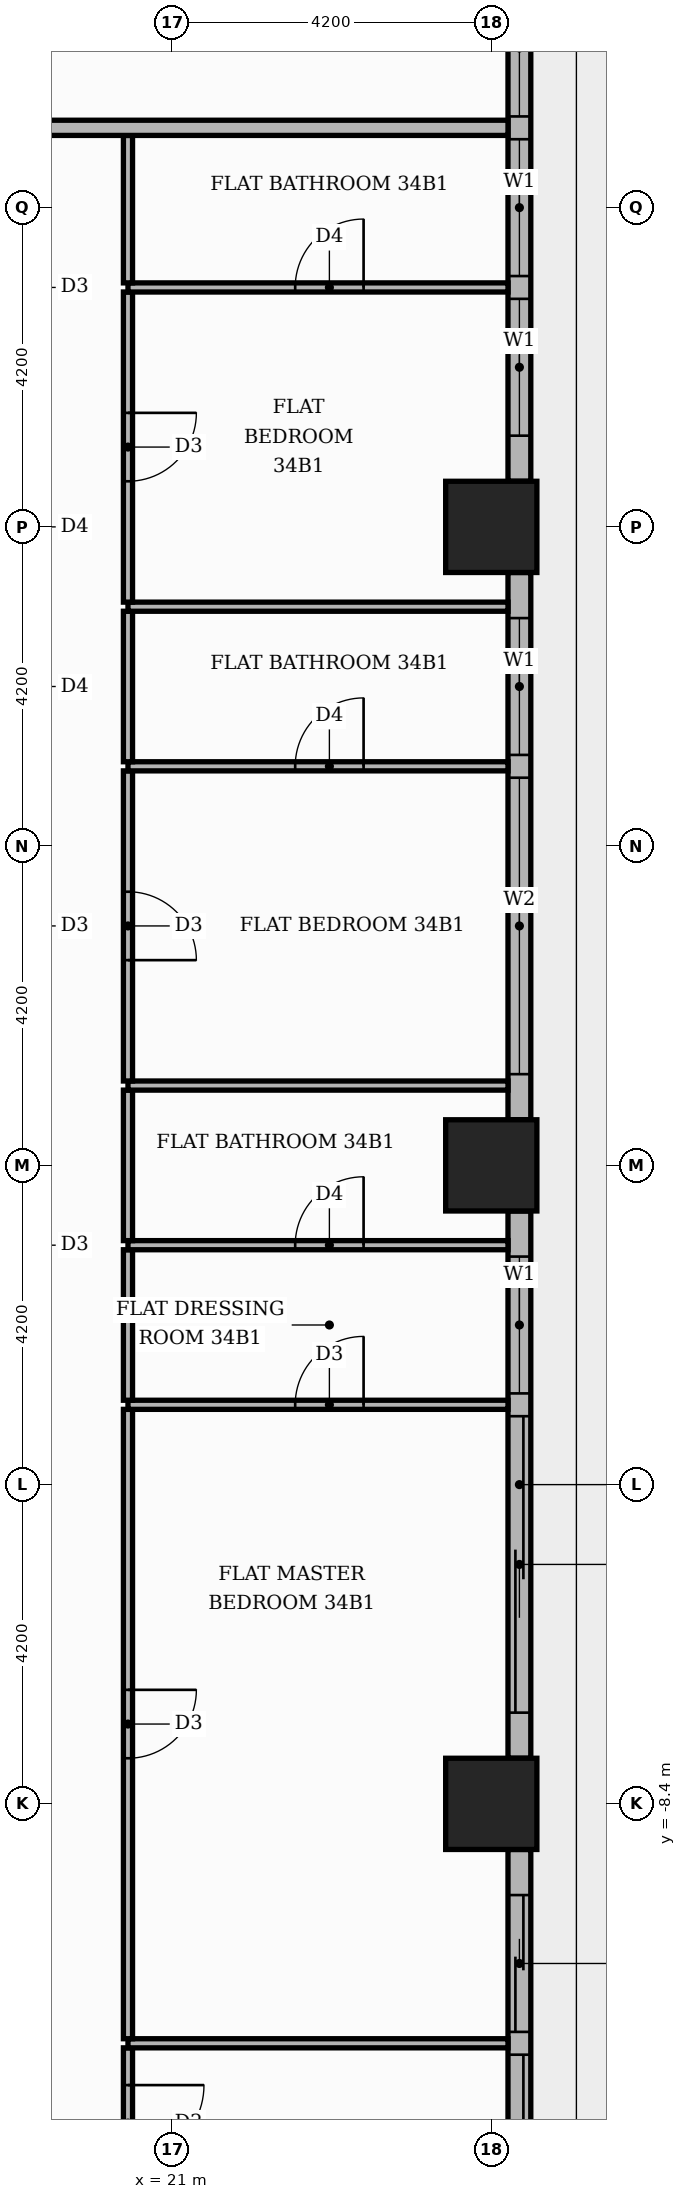
"""IFC4 building model, lengths in metres.
Left out: names, types, materials, properties, quantities, classifications, styles, units other than length and angle.
Written with IfcOpenShell. Run it as: python <this file> out.ifc"""

import sys

from ifc_helpers import new_model, si_unit, direction, frame, frame_2d, origin, origin_2d, place, context, subcontext, project, spatial, rectangle, extrude, element, fill, save


model = new_model("IFC4")
c1 = context("Model", 3, precision=1e-05, world=origin(), true_north=direction((0.0, 1.0)))
c2 = subcontext(c1, "Body", "Model", "MODEL_VIEW")
j1 = project(units=[si_unit("LENGTHUNIT", "METRE"), si_unit("PLANEANGLEUNIT", "RADIAN")], contexts=[c1])
p1 = place(None, origin())
s1 = spatial("IfcSite", under=j1, at=p1, CompositionType="ELEMENT")
p2 = place(p1, origin())
s2 = spatial("IfcBuilding", under=s1, at=p2, CompositionType="ELEMENT")
p3 = place(p2, frame((0.0, 0.0, 145.5)))
s3 = spatial("IfcBuildingStorey", under=s2, at=p3, CompositionType="ELEMENT", Elevation=145.5)
for number, where, z_axis, x_axis in (
    (1, (25.2, 0.0, 0.0), (0.0, 0.0, 1.0), (1.0, 0.0, 0.0)),
    (2, (25.2, 8.4, 0.0), (0.0, 0.0, 1.0), (1.0, 0.0, 0.0)),
    (3, (25.2, -8.4, 0.0), (0.0, 0.0, 1.0), (1.0, 0.0, 0.0)),
):
    element("IfcColumn", number, at=place(p3, frame(where, z_axis=z_axis, x_axis=x_axis)), inside=s3, PredefinedType="COLUMN", context=c2, shape_type="SweptSolid", body=[
        extrude(rectangle(XDim=1.2, YDim=1.2, at=origin_2d()), origin(), (0.0, 0.0, 1.0), 3.9),
    ])
p4 = place(p3, frame((25.57, -16.2, 0.0), z_axis=(0.0, 0.0, 1.0), x_axis=(0.0, 1.0, 0.0)))
e4 = element("IfcWall", 4, at=p4, inside=s3, PredefinedType="STANDARD", context=c2, shape_type="SweptSolid", body=[
    extrude(rectangle(XDim=7.2, YDim=0.3, at=frame_2d((3.6, 0.0))), origin(), (0.0, 0.0, 1.0), 3.48),
])
p5 = place(p4, frame((0.6, 0.0, 0.0)))
e5 = element("IfcOpeningElement", 5, at=p5, cuts=e4, PredefinedType="OPENING", context=c2, shape_type="SweptSolid", body=[
    extrude(rectangle(XDim=3.9, YDim=2.4, at=frame_2d((1.95, 1.2))), frame((0.0, 0.16, 0.0), z_axis=(0.0, -1.0, 0.0), x_axis=(1.0, 0.0, 0.0)), (0.0, 0.0, 1.0), 0.32),
])
p6 = place(p4, frame((4.8, 0.0, 0.0)))
e6 = element("IfcOpeningElement", 6, at=p6, cuts=e4, PredefinedType="OPENING", context=c2, shape_type="SweptSolid", body=[
    extrude(rectangle(XDim=1.8, YDim=2.4, at=frame_2d((0.9, 1.2))), frame((0.0, 0.16, 0.0), z_axis=(0.0, -1.0, 0.0), x_axis=(1.0, 0.0, 0.0)), (0.0, 0.0, 1.0), 0.32),
])
p7 = place(p3, frame((25.57, -7.8, 0.0), z_axis=(0.0, 0.0, 1.0), x_axis=(0.0, 1.0, 0.0)))
e7 = element("IfcWall", 7, at=p7, inside=s3, PredefinedType="STANDARD", context=c2, shape_type="SweptSolid", body=[
    extrude(rectangle(XDim=7.2, YDim=0.3, at=frame_2d((3.6, 0.0))), origin(), (0.0, 0.0, 1.0), 3.48),
])
p8 = place(p7, frame((0.6, 0.0, 0.0)))
e8 = element("IfcOpeningElement", 8, at=p8, cuts=e7, PredefinedType="OPENING", context=c2, shape_type="SweptSolid", body=[
    extrude(rectangle(XDim=3.9, YDim=2.4, at=frame_2d((1.95, 1.2))), frame((0.0, 0.16, 0.0), z_axis=(0.0, -1.0, 0.0), x_axis=(1.0, 0.0, 0.0)), (0.0, 0.0, 1.0), 0.32),
])
p9 = place(p7, frame((4.8, 0.0, 0.9)))
e9 = element("IfcOpeningElement", 9, at=p9, cuts=e7, PredefinedType="OPENING", context=c2, shape_type="SweptSolid", body=[
    extrude(rectangle(XDim=1.8, YDim=2.1, at=frame_2d((0.9, 1.05))), frame((0.0, 0.16, 0.0), z_axis=(0.0, -1.0, 0.0), x_axis=(1.0, 0.0, 0.0)), (0.0, 0.0, 1.0), 0.32),
])
p10 = place(p3, frame((25.57, 0.6, 0.0), z_axis=(0.0, 0.0, 1.0), x_axis=(0.0, 1.0, 0.0)))
e10 = element("IfcWall", 10, at=p10, inside=s3, PredefinedType="STANDARD", context=c2, shape_type="SweptSolid", body=[
    extrude(rectangle(XDim=7.2, YDim=0.3, at=frame_2d((3.6, 0.0))), origin(), (0.0, 0.0, 1.0), 3.48),
])
p11 = place(p10, frame((0.6, 0.0, 0.9)))
e11 = element("IfcOpeningElement", 11, at=p11, cuts=e10, PredefinedType="OPENING", context=c2, shape_type="SweptSolid", body=[
    extrude(rectangle(XDim=3.9, YDim=2.1, at=frame_2d((1.95, 1.05))), frame((0.0, 0.16, 0.0), z_axis=(0.0, -1.0, 0.0), x_axis=(1.0, 0.0, 0.0)), (0.0, 0.0, 1.0), 0.32),
])
p12 = place(p10, frame((4.8, 0.0, 0.9)))
e12 = element("IfcOpeningElement", 12, at=p12, cuts=e10, PredefinedType="OPENING", context=c2, shape_type="SweptSolid", body=[
    extrude(rectangle(XDim=1.8, YDim=2.1, at=frame_2d((0.9, 1.05))), frame((0.0, 0.16, 0.0), z_axis=(0.0, -1.0, 0.0), x_axis=(1.0, 0.0, 0.0)), (0.0, 0.0, 1.0), 0.32),
])
p13 = place(p3, frame((25.57, 9.0, 0.0), z_axis=(0.0, 0.0, 1.0), x_axis=(0.0, 1.0, 0.0)))
e13 = element("IfcWall", 13, at=p13, inside=s3, PredefinedType="STANDARD", context=c2, shape_type="SweptSolid", body=[
    extrude(rectangle(XDim=7.2, YDim=0.3, at=frame_2d((3.6, 0.0))), origin(), (0.0, 0.0, 1.0), 3.48),
])
p14 = place(p13, frame((0.6, 0.0, 0.9)))
e14 = element("IfcOpeningElement", 14, at=p14, cuts=e13, PredefinedType="OPENING", context=c2, shape_type="SweptSolid", body=[
    extrude(rectangle(XDim=1.8, YDim=2.1, at=frame_2d((0.9, 1.05))), frame((0.0, 0.16, 0.0), z_axis=(0.0, -1.0, 0.0), x_axis=(1.0, 0.0, 0.0)), (0.0, 0.0, 1.0), 0.32),
])
p15 = place(p13, frame((2.7, 0.0, 0.9)))
e15 = element("IfcOpeningElement", 15, at=p15, cuts=e13, PredefinedType="OPENING", context=c2, shape_type="SweptSolid", body=[
    extrude(rectangle(XDim=1.8, YDim=2.1, at=frame_2d((0.9, 1.05))), frame((0.0, 0.16, 0.0), z_axis=(0.0, -1.0, 0.0), x_axis=(1.0, 0.0, 0.0)), (0.0, 0.0, 1.0), 0.32),
])
p16 = place(p13, frame((4.8, 0.0, 0.9)))
e16 = element("IfcOpeningElement", 16, at=p16, cuts=e13, PredefinedType="OPENING", context=c2, shape_type="SweptSolid", body=[
    extrude(rectangle(XDim=1.8, YDim=2.1, at=frame_2d((0.9, 1.05))), frame((0.0, 0.16, 0.0), z_axis=(0.0, -1.0, 0.0), x_axis=(1.0, 0.0, 0.0)), (0.0, 0.0, 1.0), 0.32),
])
p17 = place(p3, frame((20.42, -13.59, 0.0), z_axis=(0.0, 0.0, 1.0), x_axis=(0.0, 1.0, 0.0)))
e17 = element("IfcWall", 17, at=p17, inside=s3, PredefinedType="PARTITIONING", context=c2, shape_type="SweptSolid", body=[
    extrude(rectangle(XDim=1.98, YDim=0.12, at=frame_2d((0.99, 0.0))), origin(), (0.0, 0.0, 1.0), 3.48),
])
p18 = place(p17, frame((0.49, 0.0, 0.0)))
e18 = element("IfcOpeningElement", 18, at=p18, cuts=e17, PredefinedType="OPENING", context=c2, shape_type="SweptSolid", body=[
    extrude(rectangle(XDim=1.0, YDim=2.1, at=frame_2d((0.5, 1.05))), frame((0.0, 0.07, 0.0), z_axis=(0.0, -1.0, 0.0), x_axis=(1.0, 0.0, 0.0)), (0.0, 0.0, 1.0), 0.14),
])
p19 = place(p3, frame((20.42, -11.55, 0.0), z_axis=(0.0, 0.0, 1.0), x_axis=(1.0, 0.0, 0.0)))
e19 = element("IfcWall", 19, at=p19, inside=s3, PredefinedType="PARTITIONING", context=c2, shape_type="SweptSolid", body=[
    extrude(rectangle(XDim=5.0, YDim=0.12, at=frame_2d((2.5, 0.0))), origin(), (0.0, 0.0, 1.0), 3.48),
])
p20 = place(p3, frame((20.42, -11.49, 0.0), z_axis=(0.0, 0.0, 1.0), x_axis=(0.0, 1.0, 0.0)))
e20 = element("IfcWall", 20, at=p20, inside=s3, PredefinedType="PARTITIONING", context=c2, shape_type="SweptSolid", body=[
    extrude(rectangle(XDim=8.28, YDim=0.12, at=frame_2d((4.14, 0.0))), origin(), (0.0, 0.0, 1.0), 3.48),
])
p21 = place(p20, frame((3.69, 0.0, 0.0)))
e21 = element("IfcOpeningElement", 21, at=p21, cuts=e20, PredefinedType="OPENING", context=c2, shape_type="SweptSolid", body=[
    extrude(rectangle(XDim=0.9, YDim=2.1, at=frame_2d((0.45, 1.05))), frame((0.0, 0.07, 0.0), z_axis=(0.0, -1.0, 0.0), x_axis=(1.0, 0.0, 0.0)), (0.0, 0.0, 1.0), 0.14),
])
p22 = place(p3, frame((20.42, -3.15, 0.0), z_axis=(0.0, 0.0, 1.0), x_axis=(1.0, 0.0, 0.0)))
e22 = element("IfcWall", 22, at=p22, inside=s3, PredefinedType="PARTITIONING", context=c2, shape_type="SweptSolid", body=[
    extrude(rectangle(XDim=5.0, YDim=0.12, at=frame_2d((2.5, 0.0))), origin(), (0.0, 0.0, 1.0), 3.48),
])
p23 = place(p22, frame((2.2, 0.0, 0.0)))
e23 = element("IfcOpeningElement", 23, at=p23, cuts=e22, PredefinedType="OPENING", context=c2, shape_type="SweptSolid", body=[
    extrude(rectangle(XDim=0.9, YDim=2.1, at=frame_2d((0.45, 1.05))), frame((0.0, 0.07, 0.0), z_axis=(0.0, -1.0, 0.0), x_axis=(1.0, 0.0, 0.0)), (0.0, 0.0, 1.0), 0.14),
])
p24 = place(p3, frame((20.42, -3.09, 0.0), z_axis=(0.0, 0.0, 1.0), x_axis=(0.0, 1.0, 0.0)))
e24 = element("IfcWall", 24, at=p24, inside=s3, PredefinedType="PARTITIONING", context=c2, shape_type="SweptSolid", body=[
    extrude(rectangle(XDim=1.98, YDim=0.12, at=frame_2d((0.99, 0.0))), origin(), (0.0, 0.0, 1.0), 3.48),
])
p25 = place(p3, frame((20.42, -1.05, 0.0), z_axis=(0.0, 0.0, 1.0), x_axis=(1.0, 0.0, 0.0)))
e25 = element("IfcWall", 25, at=p25, inside=s3, PredefinedType="PARTITIONING", context=c2, shape_type="SweptSolid", body=[
    extrude(rectangle(XDim=5.0, YDim=0.12, at=frame_2d((2.5, 0.0))), origin(), (0.0, 0.0, 1.0), 3.48),
])
p26 = place(p25, frame((2.2, 0.0, 0.0)))
e26 = element("IfcOpeningElement", 26, at=p26, cuts=e25, PredefinedType="OPENING", context=c2, shape_type="SweptSolid", body=[
    extrude(rectangle(XDim=0.9, YDim=2.1, at=frame_2d((0.45, 1.05))), frame((0.0, 0.07, 0.0), z_axis=(0.0, -1.0, 0.0), x_axis=(1.0, 0.0, 0.0)), (0.0, 0.0, 1.0), 0.14),
])
p27 = place(p3, frame((20.42, -0.99, 0.0), z_axis=(0.0, 0.0, 1.0), x_axis=(0.0, 1.0, 0.0)))
e27 = element("IfcWall", 27, at=p27, inside=s3, PredefinedType="PARTITIONING", context=c2, shape_type="SweptSolid", body=[
    extrude(rectangle(XDim=1.98, YDim=0.12, at=frame_2d((0.99, 0.0))), origin(), (0.0, 0.0, 1.0), 3.48),
])
p28 = place(p3, frame((20.42, 1.05, 0.0), z_axis=(0.0, 0.0, 1.0), x_axis=(1.0, 0.0, 0.0)))
e28 = element("IfcWall", 28, at=p28, inside=s3, PredefinedType="PARTITIONING", context=c2, shape_type="SweptSolid", body=[
    extrude(rectangle(XDim=5.0, YDim=0.12, at=frame_2d((2.5, 0.0))), origin(), (0.0, 0.0, 1.0), 3.48),
])
p29 = place(p3, frame((20.42, 1.11, 0.0), z_axis=(0.0, 0.0, 1.0), x_axis=(0.0, 1.0, 0.0)))
e29 = element("IfcWall", 29, at=p29, inside=s3, PredefinedType="PARTITIONING", context=c2, shape_type="SweptSolid", body=[
    extrude(rectangle(XDim=4.08, YDim=0.12, at=frame_2d((2.04, 0.0))), origin(), (0.0, 0.0, 1.0), 3.48),
])
p30 = place(p29, frame((1.59, 0.0, 0.0)))
e30 = element("IfcOpeningElement", 30, at=p30, cuts=e29, PredefinedType="OPENING", context=c2, shape_type="SweptSolid", body=[
    extrude(rectangle(XDim=0.9, YDim=2.1, at=frame_2d((0.45, 1.05))), frame((0.0, 0.07, 0.0), z_axis=(0.0, -1.0, 0.0), x_axis=(1.0, 0.0, 0.0)), (0.0, 0.0, 1.0), 0.14),
])
p31 = place(p3, frame((20.42, 5.25, 0.0), z_axis=(0.0, 0.0, 1.0), x_axis=(1.0, 0.0, 0.0)))
e31 = element("IfcWall", 31, at=p31, inside=s3, PredefinedType="PARTITIONING", context=c2, shape_type="SweptSolid", body=[
    extrude(rectangle(XDim=5.0, YDim=0.12, at=frame_2d((2.5, 0.0))), origin(), (0.0, 0.0, 1.0), 3.48),
])
p32 = place(p31, frame((2.2, 0.0, 0.0)))
e32 = element("IfcOpeningElement", 32, at=p32, cuts=e31, PredefinedType="OPENING", context=c2, shape_type="SweptSolid", body=[
    extrude(rectangle(XDim=0.9, YDim=2.1, at=frame_2d((0.45, 1.05))), frame((0.0, 0.07, 0.0), z_axis=(0.0, -1.0, 0.0), x_axis=(1.0, 0.0, 0.0)), (0.0, 0.0, 1.0), 0.14),
])
p33 = place(p3, frame((20.42, 5.31, 0.0), z_axis=(0.0, 0.0, 1.0), x_axis=(0.0, 1.0, 0.0)))
e33 = element("IfcWall", 33, at=p33, inside=s3, PredefinedType="PARTITIONING", context=c2, shape_type="SweptSolid", body=[
    extrude(rectangle(XDim=1.98, YDim=0.12, at=frame_2d((0.99, 0.0))), origin(), (0.0, 0.0, 1.0), 3.48),
])
p34 = place(p3, frame((20.42, 7.35, 0.0), z_axis=(0.0, 0.0, 1.0), x_axis=(1.0, 0.0, 0.0)))
e34 = element("IfcWall", 34, at=p34, inside=s3, PredefinedType="PARTITIONING", context=c2, shape_type="SweptSolid", body=[
    extrude(rectangle(XDim=5.0, YDim=0.12, at=frame_2d((2.5, 0.0))), origin(), (0.0, 0.0, 1.0), 3.48),
])
p35 = place(p3, frame((20.42, 7.41, 0.0), z_axis=(0.0, 0.0, 1.0), x_axis=(0.0, 1.0, 0.0)))
e35 = element("IfcWall", 35, at=p35, inside=s3, PredefinedType="PARTITIONING", context=c2, shape_type="SweptSolid", body=[
    extrude(rectangle(XDim=4.08, YDim=0.12, at=frame_2d((2.04, 0.0))), origin(), (0.0, 0.0, 1.0), 3.48),
])
p36 = place(p35, frame((1.59, 0.0, 0.0)))
e36 = element("IfcOpeningElement", 36, at=p36, cuts=e35, PredefinedType="OPENING", context=c2, shape_type="SweptSolid", body=[
    extrude(rectangle(XDim=0.9, YDim=2.1, at=frame_2d((0.45, 1.05))), frame((0.0, 0.07, 0.0), z_axis=(0.0, -1.0, 0.0), x_axis=(1.0, 0.0, 0.0)), (0.0, 0.0, 1.0), 0.14),
])
p37 = place(p3, frame((20.42, 11.55, 0.0), z_axis=(0.0, 0.0, 1.0), x_axis=(1.0, 0.0, 0.0)))
e37 = element("IfcWall", 37, at=p37, inside=s3, PredefinedType="PARTITIONING", context=c2, shape_type="SweptSolid", body=[
    extrude(rectangle(XDim=5.0, YDim=0.12, at=frame_2d((2.5, 0.0))), origin(), (0.0, 0.0, 1.0), 3.48),
])
p38 = place(p37, frame((2.2, 0.0, 0.0)))
e38 = element("IfcOpeningElement", 38, at=p38, cuts=e37, PredefinedType="OPENING", context=c2, shape_type="SweptSolid", body=[
    extrude(rectangle(XDim=0.9, YDim=2.1, at=frame_2d((0.45, 1.05))), frame((0.0, 0.07, 0.0), z_axis=(0.0, -1.0, 0.0), x_axis=(1.0, 0.0, 0.0)), (0.0, 0.0, 1.0), 0.14),
])
p39 = place(p3, frame((20.42, 11.61, 0.0), z_axis=(0.0, 0.0, 1.0), x_axis=(0.0, 1.0, 0.0)))
e39 = element("IfcWall", 39, at=p39, inside=s3, PredefinedType="PARTITIONING", context=c2, shape_type="SweptSolid", body=[
    extrude(rectangle(XDim=1.94, YDim=0.12, at=frame_2d((0.97, 0.0))), origin(), (0.0, 0.0, 1.0), 3.48),
])
p40 = place(p3, frame((-13.65, 13.65, 0.0), z_axis=(0.0, 0.0, 1.0), x_axis=(1.0, 0.0, 0.0)))
e40 = element("IfcWall", 40, at=p40, inside=s3, PredefinedType="PARTITIONING", context=c2, shape_type="SweptSolid", body=[
    extrude(rectangle(XDim=39.07, YDim=0.2, at=frame_2d((19.535, 0.0))), origin(), (0.0, 0.0, 1.0), 3.48),
])
p41 = place(p40, frame((23.6, 0.0, 0.0)))
e41 = element("IfcOpeningElement", 41, at=p41, cuts=e40, PredefinedType="OPENING", context=c2, shape_type="SweptSolid", body=[
    extrude(rectangle(XDim=1.1, YDim=2.4, at=frame_2d((0.55, 1.2))), frame((0.0, 0.11, 0.0), z_axis=(0.0, -1.0, 0.0), x_axis=(1.0, 0.0, 0.0)), (0.0, 0.0, 1.0), 0.22),
])
p42 = place(p5, origin())
e42 = element("IfcDoor", 42, at=p42, inside=s3, OperationType="SLIDING_TO_LEFT", PredefinedType="DOOR", context=c2, shape_type="SweptSolid", body=[
    extrude(rectangle(XDim=3.9, YDim=2.4, at=frame_2d((1.95, 1.2))), frame((0.0, 0.025, 0.0), z_axis=(0.0, -1.0, 0.0), x_axis=(1.0, 0.0, 0.0)), (0.0, 0.0, 1.0), 0.05),
])
fill(e5, e42)
p43 = place(p6, origin())
e43 = element("IfcDoor", 43, at=p43, inside=s3, OperationType="SLIDING_TO_RIGHT", PredefinedType="DOOR", context=c2, shape_type="SweptSolid", body=[
    extrude(rectangle(XDim=1.8, YDim=2.4, at=frame_2d((0.9, 1.2))), frame((0.0, 0.025, 0.0), z_axis=(0.0, -1.0, 0.0), x_axis=(1.0, 0.0, 0.0)), (0.0, 0.0, 1.0), 0.05),
])
fill(e6, e43)
p44 = place(p8, origin())
e44 = element("IfcDoor", 44, at=p44, inside=s3, OperationType="SLIDING_TO_LEFT", PredefinedType="DOOR", context=c2, shape_type="SweptSolid", body=[
    extrude(rectangle(XDim=3.9, YDim=2.4, at=frame_2d((1.95, 1.2))), frame((0.0, 0.025, 0.0), z_axis=(0.0, -1.0, 0.0), x_axis=(1.0, 0.0, 0.0)), (0.0, 0.0, 1.0), 0.05),
])
fill(e8, e44)
p45 = place(p9, origin())
e45 = element("IfcWindow", 45, at=p45, inside=s3, PartitioningType="SINGLE_PANEL", PredefinedType="WINDOW", context=c2, shape_type="SweptSolid", body=[
    extrude(rectangle(XDim=1.8, YDim=2.1, at=frame_2d((0.9, 1.05))), frame((0.0, 0.03, 0.0), z_axis=(0.0, -1.0, 0.0), x_axis=(1.0, 0.0, 0.0)), (0.0, 0.0, 1.0), 0.06),
])
fill(e9, e45)
p46 = place(p11, origin())
e46 = element("IfcWindow", 46, at=p46, inside=s3, PartitioningType="SINGLE_PANEL", PredefinedType="WINDOW", context=c2, shape_type="SweptSolid", body=[
    extrude(rectangle(XDim=3.9, YDim=2.1, at=frame_2d((1.95, 1.05))), frame((0.0, 0.03, 0.0), z_axis=(0.0, -1.0, 0.0), x_axis=(1.0, 0.0, 0.0)), (0.0, 0.0, 1.0), 0.06),
])
fill(e11, e46)
p47 = place(p12, origin())
e47 = element("IfcWindow", 47, at=p47, inside=s3, PartitioningType="SINGLE_PANEL", PredefinedType="WINDOW", context=c2, shape_type="SweptSolid", body=[
    extrude(rectangle(XDim=1.8, YDim=2.1, at=frame_2d((0.9, 1.05))), frame((0.0, 0.03, 0.0), z_axis=(0.0, -1.0, 0.0), x_axis=(1.0, 0.0, 0.0)), (0.0, 0.0, 1.0), 0.06),
])
fill(e12, e47)
p48 = place(p14, origin())
e48 = element("IfcWindow", 48, at=p48, inside=s3, PartitioningType="SINGLE_PANEL", PredefinedType="WINDOW", context=c2, shape_type="SweptSolid", body=[
    extrude(rectangle(XDim=1.8, YDim=2.1, at=frame_2d((0.9, 1.05))), frame((0.0, 0.03, 0.0), z_axis=(0.0, -1.0, 0.0), x_axis=(1.0, 0.0, 0.0)), (0.0, 0.0, 1.0), 0.06),
])
fill(e14, e48)
p49 = place(p15, origin())
e49 = element("IfcWindow", 49, at=p49, inside=s3, PartitioningType="SINGLE_PANEL", PredefinedType="WINDOW", context=c2, shape_type="SweptSolid", body=[
    extrude(rectangle(XDim=1.8, YDim=2.1, at=frame_2d((0.9, 1.05))), frame((0.0, 0.03, 0.0), z_axis=(0.0, -1.0, 0.0), x_axis=(1.0, 0.0, 0.0)), (0.0, 0.0, 1.0), 0.06),
])
fill(e15, e49)
p50 = place(p16, origin())
e50 = element("IfcWindow", 50, at=p50, inside=s3, PartitioningType="SINGLE_PANEL", PredefinedType="WINDOW", context=c2, shape_type="SweptSolid", body=[
    extrude(rectangle(XDim=1.8, YDim=2.1, at=frame_2d((0.9, 1.05))), frame((0.0, 0.03, 0.0), z_axis=(0.0, -1.0, 0.0), x_axis=(1.0, 0.0, 0.0)), (0.0, 0.0, 1.0), 0.06),
])
fill(e16, e50)
p51 = place(p18, frame((1.0, 0.0, 0.0), z_axis=(0.0, 0.0, 1.0), x_axis=(-1.0, 0.0, 0.0)))
e51 = element("IfcDoor", 51, at=p51, inside=s3, OperationType="SINGLE_SWING_RIGHT", PredefinedType="DOOR", context=c2, shape_type="SweptSolid", body=[
    extrude(rectangle(XDim=1.0, YDim=2.1, at=frame_2d((0.5, 1.05))), frame((0.0, 0.025, 0.0), z_axis=(0.0, -1.0, 0.0), x_axis=(1.0, 0.0, 0.0)), (0.0, 0.0, 1.0), 0.05),
])
fill(e18, e51)
p52 = place(p21, frame((0.9, 0.0, 0.0), z_axis=(0.0, 0.0, 1.0), x_axis=(-1.0, 0.0, 0.0)))
e52 = element("IfcDoor", 52, at=p52, inside=s3, OperationType="SINGLE_SWING_RIGHT", PredefinedType="DOOR", context=c2, shape_type="SweptSolid", body=[
    extrude(rectangle(XDim=0.9, YDim=2.1, at=frame_2d((0.45, 1.05))), frame((0.0, 0.025, 0.0), z_axis=(0.0, -1.0, 0.0), x_axis=(1.0, 0.0, 0.0)), (0.0, 0.0, 1.0), 0.05),
])
fill(e21, e52)
p53 = place(p23, origin())
e53 = element("IfcDoor", 53, at=p53, inside=s3, OperationType="SINGLE_SWING_RIGHT", PredefinedType="DOOR", context=c2, shape_type="SweptSolid", body=[
    extrude(rectangle(XDim=0.9, YDim=2.1, at=frame_2d((0.45, 1.05))), frame((0.0, 0.025, 0.0), z_axis=(0.0, -1.0, 0.0), x_axis=(1.0, 0.0, 0.0)), (0.0, 0.0, 1.0), 0.05),
])
fill(e23, e53)
p54 = place(p26, origin())
e54 = element("IfcDoor", 54, at=p54, inside=s3, OperationType="SINGLE_SWING_RIGHT", PredefinedType="DOOR", context=c2, shape_type="SweptSolid", body=[
    extrude(rectangle(XDim=0.9, YDim=2.1, at=frame_2d((0.45, 1.05))), frame((0.0, 0.025, 0.0), z_axis=(0.0, -1.0, 0.0), x_axis=(1.0, 0.0, 0.0)), (0.0, 0.0, 1.0), 0.05),
])
fill(e26, e54)
p55 = place(p30, frame((0.9, 0.0, 0.0), z_axis=(0.0, 0.0, 1.0), x_axis=(-1.0, 0.0, 0.0)))
e55 = element("IfcDoor", 55, at=p55, inside=s3, OperationType="SINGLE_SWING_LEFT", PredefinedType="DOOR", context=c2, shape_type="SweptSolid", body=[
    extrude(rectangle(XDim=0.9, YDim=2.1, at=frame_2d((0.45, 1.05))), frame((0.0, 0.025, 0.0), z_axis=(0.0, -1.0, 0.0), x_axis=(1.0, 0.0, 0.0)), (0.0, 0.0, 1.0), 0.05),
])
fill(e30, e55)
p56 = place(p32, origin())
e56 = element("IfcDoor", 56, at=p56, inside=s3, OperationType="SINGLE_SWING_RIGHT", PredefinedType="DOOR", context=c2, shape_type="SweptSolid", body=[
    extrude(rectangle(XDim=0.9, YDim=2.1, at=frame_2d((0.45, 1.05))), frame((0.0, 0.025, 0.0), z_axis=(0.0, -1.0, 0.0), x_axis=(1.0, 0.0, 0.0)), (0.0, 0.0, 1.0), 0.05),
])
fill(e32, e56)
p57 = place(p36, frame((0.9, 0.0, 0.0), z_axis=(0.0, 0.0, 1.0), x_axis=(-1.0, 0.0, 0.0)))
e57 = element("IfcDoor", 57, at=p57, inside=s3, OperationType="SINGLE_SWING_RIGHT", PredefinedType="DOOR", context=c2, shape_type="SweptSolid", body=[
    extrude(rectangle(XDim=0.9, YDim=2.1, at=frame_2d((0.45, 1.05))), frame((0.0, 0.025, 0.0), z_axis=(0.0, -1.0, 0.0), x_axis=(1.0, 0.0, 0.0)), (0.0, 0.0, 1.0), 0.05),
])
fill(e36, e57)
p58 = place(p38, origin())
e58 = element("IfcDoor", 58, at=p58, inside=s3, OperationType="SINGLE_SWING_RIGHT", PredefinedType="DOOR", context=c2, shape_type="SweptSolid", body=[
    extrude(rectangle(XDim=0.9, YDim=2.1, at=frame_2d((0.45, 1.05))), frame((0.0, 0.025, 0.0), z_axis=(0.0, -1.0, 0.0), x_axis=(1.0, 0.0, 0.0)), (0.0, 0.0, 1.0), 0.05),
])
fill(e38, e58)
save(model, sys.argv[1])
